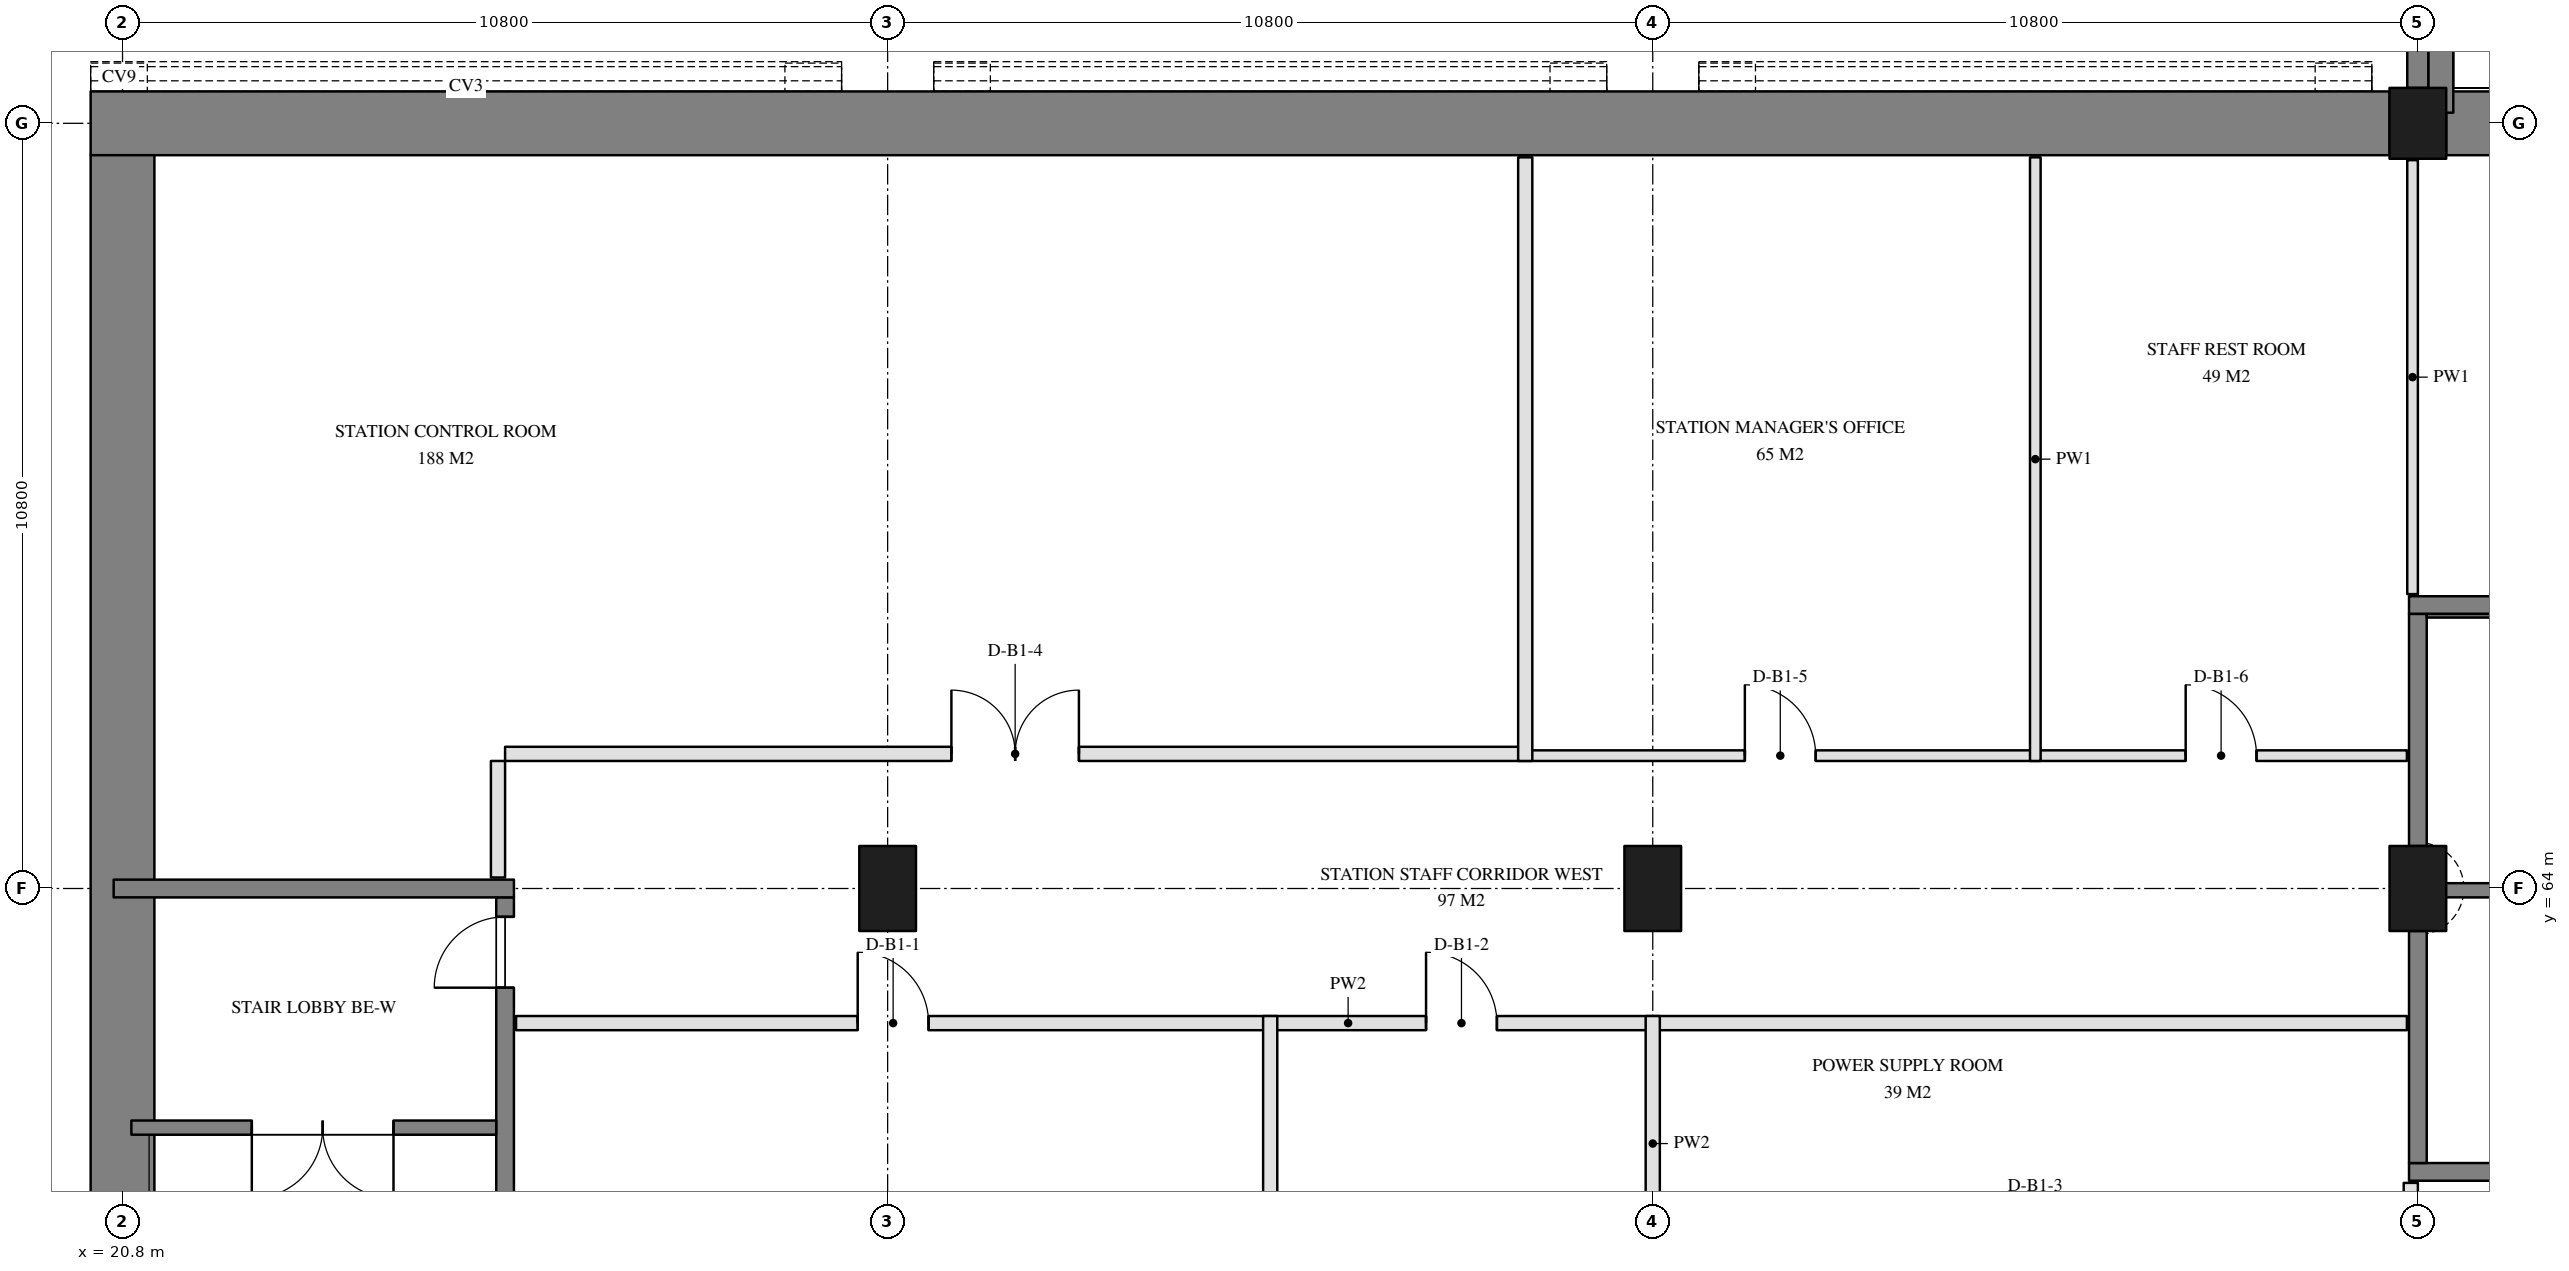
"""IFC4 building model, lengths in metres.
Left out: names, types, materials, properties, quantities, classifications, styles, units other than length and angle.
Written with IfcOpenShell. Run it as: python <this file> out.ifc"""

import sys

from ifc_helpers import new_model, si_unit, direction, frame, frame_2d, origin, origin_2d, place, context, subcontext, project, spatial, rectangle, extrude, element, fill, save


model = new_model("IFC4")
c1 = context("Model", 3, precision=1e-05, world=origin(), true_north=direction((0.0, 1.0)))
c2 = subcontext(c1, "Body", "Model", "MODEL_VIEW")
j1 = project(units=[si_unit("LENGTHUNIT", "METRE"), si_unit("PLANEANGLEUNIT", "RADIAN")], contexts=[c1])
p1 = place(None, origin())
s1 = spatial("IfcSite", under=j1, at=p1, CompositionType="ELEMENT")
p2 = place(p1, origin())
s2 = spatial("IfcBuilding", under=s1, at=p2, CompositionType="ELEMENT")
p3 = place(p2, frame((0.0, 0.0, -5.4)))
s3 = spatial("IfcBuildingStorey", under=s2, at=p3, CompositionType="ELEMENT", Elevation=-5.4)
for number, where, z_axis, x_axis in (
    (1, (31.6, 64.0, 0.0), (0.0, 0.0, 1.0), (1.0, 0.0, 0.0)),
    (2, (42.4, 64.0, 0.0), (0.0, 0.0, 1.0), (1.0, 0.0, 0.0)),
    (3, (53.2, 64.0, 0.0), (0.0, 0.0, 1.0), (1.0, 0.0, 0.0)),
):
    element("IfcColumn", number, at=place(p3, frame(where, z_axis=z_axis, x_axis=x_axis)), inside=s3, PredefinedType="COLUMN", context=c2, shape_type="SweptSolid", body=[
        extrude(rectangle(XDim=0.8, YDim=1.2, at=origin_2d()), origin(), (0.0, 0.0, 1.0), 5.4),
    ])
p4 = place(p3, frame((53.2, 74.8, 0.0), z_axis=(0.0, 0.0, 1.0), x_axis=(1.0, 0.0, 0.0)))
e4 = element("IfcColumn", 4, at=p4, inside=s3, PredefinedType="COLUMN", context=c2, shape_type="SweptSolid", body=[
    extrude(rectangle(XDim=0.8, YDim=1.0, at=origin_2d()), origin(), (0.0, 0.0, 1.0), 5.4),
])
p5 = place(p3, frame((63.6, 74.8, 0.0), z_axis=(0.0, 0.0, 1.0), x_axis=(-1.0, 0.0, 0.0)))
e5 = element("IfcWall", 5, at=p5, inside=s3, PredefinedType="SOLIDWALL", context=c2, shape_type="SweptSolid", body=[
    extrude(rectangle(XDim=10.0, YDim=0.9, at=frame_2d((5.0, 0.0))), origin(), (0.0, 0.0, 1.0), 4.8),
])
p6 = place(p3, frame((52.8, 74.8, 0.0), z_axis=(0.0, 0.0, 1.0), x_axis=(-1.0, 0.0, 0.0)))
e6 = element("IfcWall", 6, at=p6, inside=s3, PredefinedType="SOLIDWALL", context=c2, shape_type="SweptSolid", body=[
    extrude(rectangle(XDim=32.45, YDim=0.9, at=frame_2d((16.225, 0.0))), origin(), (0.0, 0.0, 1.0), 4.8),
])
p7 = place(p3, frame((20.8, 74.35, 0.0), z_axis=(0.0, 0.0, 1.0), x_axis=(0.0, -1.0, 0.0)))
e7 = element("IfcWall", 7, at=p7, inside=s3, PredefinedType="SOLIDWALL", context=c2, shape_type="SweptSolid", body=[
    extrude(rectangle(XDim=20.7, YDim=0.9, at=frame_2d((10.35, 0.0))), origin(), (0.0, 0.0, 1.0), 4.8),
])
p8 = place(p3, frame((53.2, 85.1, 0.0), z_axis=(0.0, 0.0, 1.0), x_axis=(0.0, -1.0, 0.0)))
e8 = element("IfcWall", 8, at=p8, inside=s3, PredefinedType="SOLIDWALL", context=c2, shape_type="SweptSolid", body=[
    extrude(rectangle(XDim=9.8, YDim=0.3, at=frame_2d((4.9, 0.0))), origin(), (0.0, 0.0, 1.0), 5.4),
])
p9 = place(p3, frame((53.075, 60.0, 0.0), z_axis=(0.0, 0.0, 1.0), x_axis=(1.0, 0.0, 0.0)))
e9 = element("IfcWall", 9, at=p9, inside=s3, PredefinedType="SOLIDWALL", context=c2, shape_type="SweptSolid", body=[
    extrude(rectangle(XDim=11.05, YDim=0.25, at=frame_2d((5.525, 0.0))), origin(), (0.0, 0.0, 1.0), 4.8),
])
p10 = place(p9, frame((6.975, 0.0, 0.0)))
e10 = element("IfcOpeningElement", 10, at=p10, cuts=e9, PredefinedType="OPENING", context=c2, shape_type="SweptSolid", body=[
    extrude(rectangle(XDim=1.0, YDim=2.1, at=frame_2d((0.5, 1.05))), frame((0.0, 0.135, 0.0), z_axis=(0.0, -1.0, 0.0), x_axis=(1.0, 0.0, 0.0)), (0.0, 0.0, 1.0), 0.27),
])
p11 = place(p3, frame((64.125, 68.0, 0.0), z_axis=(0.0, 0.0, 1.0), x_axis=(-1.0, 0.0, 0.0)))
e11 = element("IfcWall", 11, at=p11, inside=s3, PredefinedType="SOLIDWALL", context=c2, shape_type="SweptSolid", body=[
    extrude(rectangle(XDim=11.05, YDim=0.25, at=frame_2d((5.525, 0.0))), origin(), (0.0, 0.0, 1.0), 4.8),
])
for number, where, z_axis, x_axis in (
    (12, (53.2, 67.875, 0.0), (0.0, 0.0, 1.0), (0.0, -1.0, 0.0)),
    (13, (53.2, 63.4, 0.0), (0.0, 0.0, 1.0), (0.0, -1.0, 0.0)),
):
    element("IfcWall", number, at=place(p3, frame(where, z_axis=z_axis, x_axis=x_axis)), inside=s3, PredefinedType="SOLIDWALL", context=c2, shape_type="SweptSolid", body=[
        extrude(rectangle(XDim=3.275, YDim=0.25, at=frame_2d((1.637, 0.0))), origin(), (0.0, 0.0, 1.0), 4.8),
    ])
p12 = place(p3, frame((26.2, 53.325, 0.0), z_axis=(0.0, 0.0, 1.0), x_axis=(0.0, 1.0, 0.0)))
e14 = element("IfcWall", 14, at=p12, inside=s3, PredefinedType="SOLIDWALL", context=c2, shape_type="SweptSolid", body=[
    extrude(rectangle(XDim=10.55, YDim=0.25, at=frame_2d((5.275, 0.0))), origin(), (0.0, 0.0, 1.0), 5.4),
])
p13 = place(p12, frame((9.275, 0.0, 0.0)))
e15 = element("IfcOpeningElement", 15, at=p13, cuts=e14, PredefinedType="OPENING", context=c2, shape_type="SweptSolid", body=[
    extrude(rectangle(XDim=1.0, YDim=2.1, at=frame_2d((0.5, 1.05))), frame((0.0, 0.135, 0.0), z_axis=(0.0, -1.0, 0.0), x_axis=(1.0, 0.0, 0.0)), (0.0, 0.0, 1.0), 0.27),
])
p14 = place(p3, frame((26.325, 64.0, 0.0), z_axis=(0.0, 0.0, 1.0), x_axis=(-1.0, 0.0, 0.0)))
e16 = element("IfcWall", 16, at=p14, inside=s3, PredefinedType="SOLIDWALL", context=c2, shape_type="SweptSolid", body=[
    extrude(rectangle(XDim=5.65, YDim=0.25, at=frame_2d((2.825, 0.0))), origin(), (0.0, 0.0, 1.0), 5.4),
])
p15 = place(p3, frame((53.525, 74.95, 0.0), z_axis=(0.0, 0.0, 1.0), x_axis=(0.0, 1.0, 0.0)))
e17 = element("IfcWall", 17, at=p15, inside=s3, PredefinedType="SOLIDWALL", context=c2, shape_type="SweptSolid", body=[
    extrude(rectangle(XDim=3.5, YDim=0.35, at=frame_2d((1.75, 0.0))), origin(), (0.0, 0.0, 1.0), 4.8),
])
p16 = place(p3, frame((59.525, 63.975, 0.0), z_axis=(0.0, 0.0, 1.0), x_axis=(-1.0, 0.0, 0.0)))
e18 = element("IfcWall", 18, at=p16, inside=s3, PredefinedType="SOLIDWALL", context=c2, shape_type="SweptSolid", body=[
    extrude(rectangle(XDim=6.2, YDim=0.2, at=frame_2d((3.1, 0.0))), origin(), (0.0, 0.0, 1.0), 3.6),
])
p17 = place(p3, frame((59.525, 67.85, 0.0), z_axis=(0.0, 0.0, 1.0), x_axis=(-1.0, 0.0, 0.0)))
e19 = element("IfcWall", 19, at=p17, inside=s3, PredefinedType="SOLIDWALL", context=c2, shape_type="SweptSolid", body=[
    extrude(rectangle(XDim=6.2, YDim=0.05, at=frame_2d((3.1, 0.0))), origin(), (0.0, 0.0, 1.0), 3.6),
])
p18 = place(p3, frame((26.075, 60.625, 0.0), z_axis=(0.0, 0.0, 1.0), x_axis=(-1.0, 0.0, 0.0)))
e20 = element("IfcWall", 20, at=p18, inside=s3, PredefinedType="SOLIDWALL", context=c2, shape_type="SweptSolid", body=[
    extrude(rectangle(XDim=5.15, YDim=0.2, at=frame_2d((2.575, 0.0))), origin(), (0.0, 0.0, 1.0), 4.8),
])
p19 = place(p18, frame((1.45, 0.0, 0.0)))
e21 = element("IfcOpeningElement", 21, at=p19, cuts=e20, PredefinedType="OPENING", context=c2, shape_type="SweptSolid", body=[
    extrude(rectangle(XDim=2.0, YDim=2.1, at=frame_2d((1.0, 1.05))), frame((0.0, 0.11, 0.0), z_axis=(0.0, -1.0, 0.0), x_axis=(1.0, 0.0, 0.0)), (0.0, 0.0, 1.0), 0.22),
])
p20 = place(p3, frame((37.0, 62.1, 0.0), z_axis=(0.0, 0.0, 1.0), x_axis=(1.0, 0.0, 0.0)))
e22 = element("IfcWall", 22, at=p20, inside=s3, PredefinedType="PARTITIONING", context=c2, shape_type="SweptSolid", body=[
    extrude(rectangle(XDim=5.4, YDim=0.2, at=frame_2d((2.7, 0.0))), origin(), (0.0, 0.0, 1.0), 3.6),
])
p21 = place(p20, frame((2.2, 0.0, 0.0)))
e23 = element("IfcOpeningElement", 23, at=p21, cuts=e22, PredefinedType="OPENING", context=c2, shape_type="SweptSolid", body=[
    extrude(rectangle(XDim=1.0, YDim=2.1, at=frame_2d((0.5, 1.05))), frame((0.0, 0.11, 0.0), z_axis=(0.0, -1.0, 0.0), x_axis=(1.0, 0.0, 0.0)), (0.0, 0.0, 1.0), 0.22),
])
p22 = place(p3, frame((26.355, 62.1, 0.0), z_axis=(0.0, 0.0, 1.0), x_axis=(1.0, 0.0, 0.0)))
e24 = element("IfcWall", 24, at=p22, inside=s3, PredefinedType="PARTITIONING", context=c2, shape_type="SweptSolid", body=[
    extrude(rectangle(XDim=10.645, YDim=0.2, at=frame_2d((5.323, 0.0))), origin(), (0.0, 0.0, 1.0), 3.6),
])
p23 = place(p22, frame((4.823, 0.0, 0.0)))
e25 = element("IfcOpeningElement", 25, at=p23, cuts=e24, PredefinedType="OPENING", context=c2, shape_type="SweptSolid", body=[
    extrude(rectangle(XDim=1.0, YDim=2.1, at=frame_2d((0.5, 1.05))), frame((0.0, 0.11, 0.0), z_axis=(0.0, -1.0, 0.0), x_axis=(1.0, 0.0, 0.0)), (0.0, 0.0, 1.0), 0.22),
])
p24 = place(p3, frame((42.4, 62.1, 0.0), z_axis=(0.0, 0.0, 1.0), x_axis=(1.0, 0.0, 0.0)))
e26 = element("IfcWall", 26, at=p24, inside=s3, PredefinedType="PARTITIONING", context=c2, shape_type="SweptSolid", body=[
    extrude(rectangle(XDim=10.645, YDim=0.2, at=frame_2d((5.323, 0.0))), origin(), (0.0, 0.0, 1.0), 3.6),
])
p25 = place(p3, frame((26.1, 64.155, 0.0), z_axis=(0.0, 0.0, 1.0), x_axis=(0.0, 1.0, 0.0)))
e27 = element("IfcWall", 27, at=p25, inside=s3, PredefinedType="PARTITIONING", context=c2, shape_type="SweptSolid", body=[
    extrude(rectangle(XDim=1.645, YDim=0.2, at=frame_2d((0.823, 0.0))), origin(), (0.0, 0.0, 1.0), 4.8),
])
p26 = place(p3, frame((26.2, 65.9, 0.0), z_axis=(0.0, 0.0, 1.0), x_axis=(1.0, 0.0, 0.0)))
e28 = element("IfcWall", 28, at=p26, inside=s3, PredefinedType="PARTITIONING", context=c2, shape_type="SweptSolid", body=[
    extrude(rectangle(XDim=14.4, YDim=0.2, at=frame_2d((7.2, 0.0))), origin(), (0.0, 0.0, 1.0), 3.6),
])
p27 = place(p26, frame((6.3, 0.0, 0.0)))
e29 = element("IfcOpeningElement", 29, at=p27, cuts=e28, PredefinedType="OPENING", context=c2, shape_type="SweptSolid", body=[
    extrude(rectangle(XDim=1.8, YDim=2.1, at=frame_2d((0.9, 1.05))), frame((0.0, 0.11, 0.0), z_axis=(0.0, -1.0, 0.0), x_axis=(1.0, 0.0, 0.0)), (0.0, 0.0, 1.0), 0.22),
])
p28 = place(p3, frame((40.6, 65.875, 0.0), z_axis=(0.0, 0.0, 1.0), x_axis=(1.0, 0.0, 0.0)))
e30 = element("IfcWall", 30, at=p28, inside=s3, PredefinedType="PARTITIONING", context=c2, shape_type="SweptSolid", body=[
    extrude(rectangle(XDim=7.2, YDim=0.15, at=frame_2d((3.6, 0.0))), origin(), (0.0, 0.0, 1.0), 3.6),
])
p29 = place(p28, frame((3.1, 0.0, 0.0)))
e31 = element("IfcOpeningElement", 31, at=p29, cuts=e30, PredefinedType="OPENING", context=c2, shape_type="SweptSolid", body=[
    extrude(rectangle(XDim=1.0, YDim=2.1, at=frame_2d((0.5, 1.05))), frame((0.0, 0.085, 0.0), z_axis=(0.0, -1.0, 0.0), x_axis=(1.0, 0.0, 0.0)), (0.0, 0.0, 1.0), 0.17),
])
p30 = place(p3, frame((47.8, 65.875, 0.0), z_axis=(0.0, 0.0, 1.0), x_axis=(1.0, 0.0, 0.0)))
e32 = element("IfcWall", 32, at=p30, inside=s3, PredefinedType="PARTITIONING", context=c2, shape_type="SweptSolid", body=[
    extrude(rectangle(XDim=5.245, YDim=0.15, at=frame_2d((2.623, 0.0))), origin(), (0.0, 0.0, 1.0), 3.6),
])
p31 = place(p30, frame((2.123, 0.0, 0.0)))
e33 = element("IfcOpeningElement", 33, at=p31, cuts=e32, PredefinedType="OPENING", context=c2, shape_type="SweptSolid", body=[
    extrude(rectangle(XDim=1.0, YDim=2.1, at=frame_2d((0.5, 1.05))), frame((0.0, 0.085, 0.0), z_axis=(0.0, -1.0, 0.0), x_axis=(1.0, 0.0, 0.0)), (0.0, 0.0, 1.0), 0.17),
])
p32 = place(p3, frame((37.0, 53.68, 0.0), z_axis=(0.0, 0.0, 1.0), x_axis=(0.0, 1.0, 0.0)))
e34 = element("IfcWall", 34, at=p32, inside=s3, PredefinedType="PARTITIONING", context=c2, shape_type="SweptSolid", body=[
    extrude(rectangle(XDim=8.52, YDim=0.2, at=frame_2d((4.26, 0.0))), origin(), (0.0, 0.0, 1.0), 4.8),
])
p33 = place(p3, frame((42.4, 58.6, 0.0), z_axis=(0.0, 0.0, 1.0), x_axis=(0.0, 1.0, 0.0)))
e35 = element("IfcWall", 35, at=p33, inside=s3, PredefinedType="PARTITIONING", context=c2, shape_type="SweptSolid", body=[
    extrude(rectangle(XDim=3.6, YDim=0.2, at=frame_2d((1.8, 0.0))), origin(), (0.0, 0.0, 1.0), 3.6),
])
p34 = place(p3, frame((53.1, 58.6, 0.0), z_axis=(0.0, 0.0, 1.0), x_axis=(0.0, 1.0, 0.0)))
e36 = element("IfcWall", 36, at=p34, inside=s3, PredefinedType="PARTITIONING", context=c2, shape_type="SweptSolid", body=[
    extrude(rectangle(XDim=1.245, YDim=0.2, at=frame_2d((0.623, 0.0))), origin(), (0.0, 0.0, 1.0), 3.6),
])
p35 = place(p3, frame((40.6, 65.8, 0.0), z_axis=(0.0, 0.0, 1.0), x_axis=(0.0, 1.0, 0.0)))
e37 = element("IfcWall", 37, at=p35, inside=s3, PredefinedType="PARTITIONING", context=c2, shape_type="SweptSolid", body=[
    extrude(rectangle(XDim=8.52, YDim=0.2, at=frame_2d((4.26, 0.0))), origin(), (0.0, 0.0, 1.0), 4.8),
])
p36 = place(p3, frame((47.8, 65.8, 0.0), z_axis=(0.0, 0.0, 1.0), x_axis=(0.0, 1.0, 0.0)))
e38 = element("IfcWall", 38, at=p36, inside=s3, PredefinedType="PARTITIONING", context=c2, shape_type="SweptSolid", body=[
    extrude(rectangle(XDim=8.52, YDim=0.15, at=frame_2d((4.26, 0.0))), origin(), (0.0, 0.0, 1.0), 4.8),
])
p37 = place(p3, frame((53.125, 68.155, 0.0), z_axis=(0.0, 0.0, 1.0), x_axis=(0.0, 1.0, 0.0)))
e39 = element("IfcWall", 39, at=p37, inside=s3, PredefinedType="PARTITIONING", context=c2, shape_type="SweptSolid", body=[
    extrude(rectangle(XDim=6.125, YDim=0.15, at=frame_2d((3.062, 0.0))), origin(), (0.0, 0.0, 1.0), 3.6),
])
p38 = place(p19, frame((2.0, 0.0, 0.0), z_axis=(0.0, 0.0, 1.0), x_axis=(-1.0, 0.0, 0.0)))
e40 = element("IfcDoor", 40, at=p38, inside=s3, OperationType="DOUBLE_DOOR_DOUBLE_SWING", PredefinedType="DOOR", context=c2, shape_type="SweptSolid", body=[
    extrude(rectangle(XDim=2.0, YDim=2.1, at=frame_2d((1.0, 1.05))), frame((0.0, 0.025, 0.0), z_axis=(0.0, -1.0, 0.0), x_axis=(1.0, 0.0, 0.0)), (0.0, 0.0, 1.0), 0.05),
])
fill(e21, e40)
p39 = place(p13, frame((1.0, 0.0, 0.0), z_axis=(0.0, 0.0, 1.0), x_axis=(-1.0, 0.0, 0.0)))
e41 = element("IfcDoor", 41, at=p39, inside=s3, OperationType="SINGLE_SWING_LEFT", PredefinedType="DOOR", context=c2, shape_type="SweptSolid", body=[
    extrude(rectangle(XDim=1.0, YDim=2.1, at=frame_2d((0.5, 1.05))), frame((0.0, 0.025, 0.0), z_axis=(0.0, -1.0, 0.0), x_axis=(1.0, 0.0, 0.0)), (0.0, 0.0, 1.0), 0.05),
])
fill(e15, e41)
p40 = place(p23, frame((1.0, 0.0, 0.0), z_axis=(0.0, 0.0, 1.0), x_axis=(-1.0, 0.0, 0.0)))
e42 = element("IfcDoor", 42, at=p40, inside=s3, OperationType="SINGLE_SWING_LEFT", PredefinedType="DOOR", context=c2, shape_type="SweptSolid", body=[
    extrude(rectangle(XDim=1.0, YDim=2.1, at=frame_2d((0.5, 1.05))), frame((0.0, 0.025, 0.0), z_axis=(0.0, -1.0, 0.0), x_axis=(1.0, 0.0, 0.0)), (0.0, 0.0, 1.0), 0.05),
])
fill(e25, e42)
p41 = place(p21, frame((1.0, 0.0, 0.0), z_axis=(0.0, 0.0, 1.0), x_axis=(-1.0, 0.0, 0.0)))
e43 = element("IfcDoor", 43, at=p41, inside=s3, OperationType="SINGLE_SWING_LEFT", PredefinedType="DOOR", context=c2, shape_type="SweptSolid", body=[
    extrude(rectangle(XDim=1.0, YDim=2.1, at=frame_2d((0.5, 1.05))), frame((0.0, 0.025, 0.0), z_axis=(0.0, -1.0, 0.0), x_axis=(1.0, 0.0, 0.0)), (0.0, 0.0, 1.0), 0.05),
])
fill(e23, e43)
p42 = place(p27, origin())
e44 = element("IfcDoor", 44, at=p42, inside=s3, OperationType="DOUBLE_DOOR_DOUBLE_SWING", PredefinedType="DOOR", context=c2, shape_type="SweptSolid", body=[
    extrude(rectangle(XDim=1.8, YDim=2.1, at=frame_2d((0.9, 1.05))), frame((0.0, 0.025, 0.0), z_axis=(0.0, -1.0, 0.0), x_axis=(1.0, 0.0, 0.0)), (0.0, 0.0, 1.0), 0.05),
])
fill(e29, e44)
p43 = place(p29, origin())
e45 = element("IfcDoor", 45, at=p43, inside=s3, OperationType="SINGLE_SWING_RIGHT", PredefinedType="DOOR", context=c2, shape_type="SweptSolid", body=[
    extrude(rectangle(XDim=1.0, YDim=2.1, at=frame_2d((0.5, 1.05))), frame((0.0, 0.025, 0.0), z_axis=(0.0, -1.0, 0.0), x_axis=(1.0, 0.0, 0.0)), (0.0, 0.0, 1.0), 0.05),
])
fill(e31, e45)
p44 = place(p31, origin())
e46 = element("IfcDoor", 46, at=p44, inside=s3, OperationType="SINGLE_SWING_LEFT", PredefinedType="DOOR", context=c2, shape_type="SweptSolid", body=[
    extrude(rectangle(XDim=1.0, YDim=2.1, at=frame_2d((0.5, 1.05))), frame((0.0, 0.025, 0.0), z_axis=(0.0, -1.0, 0.0), x_axis=(1.0, 0.0, 0.0)), (0.0, 0.0, 1.0), 0.05),
])
fill(e33, e46)
save(model, sys.argv[1])
